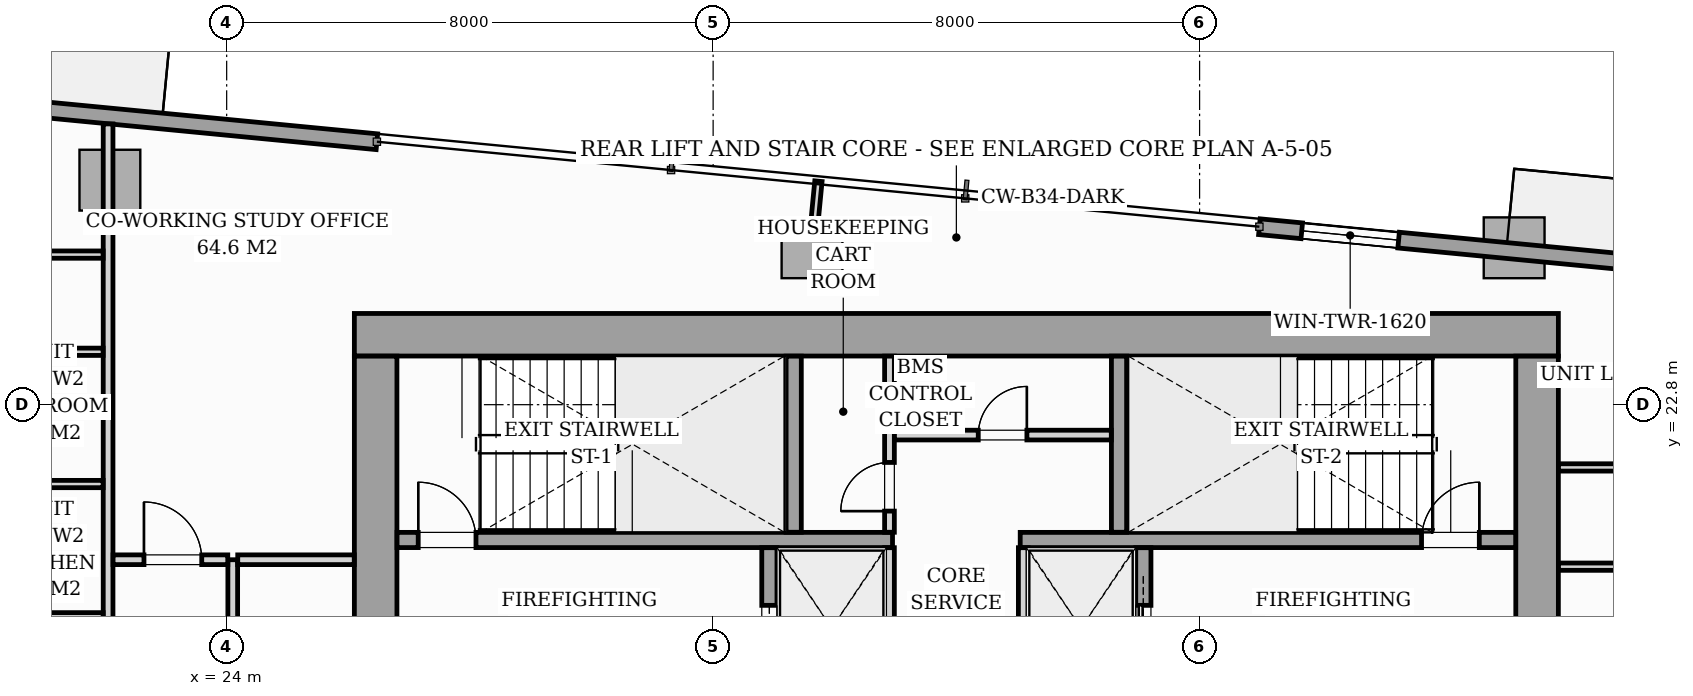
"""IFC4 building model, lengths in metres.
Left out: names, types, materials, properties, quantities, classifications, styles, units other than length and angle.
Written with IfcOpenShell. Run it as: python <this file> out.ifc"""

import sys

from ifc_helpers import new_model, si_unit, direction, frame, frame_2d, origin, origin_2d, place, context, subcontext, project, spatial, rectangle, i_section, extrude, source, transform, mapped, element, fill, save


model = new_model("IFC4")
c1 = context("Model", 3, precision=1e-05, world=origin(), true_north=direction((0.0, 1.0)))
c2 = subcontext(c1, "Body", "Model", "MODEL_VIEW")
j1 = project(units=[si_unit("LENGTHUNIT", "METRE"), si_unit("PLANEANGLEUNIT", "RADIAN")], contexts=[c1])
p1 = place(None, origin())
s1 = spatial("IfcSite", under=j1, at=p1, CompositionType="ELEMENT")
p2 = place(p1, origin())
s2 = spatial("IfcBuilding", under=s1, at=p2, CompositionType="ELEMENT")
p3 = place(p2, frame((0.0, 0.0, 131.0)))
s3 = spatial("IfcBuildingStorey", under=s2, at=p3, CompositionType="ELEMENT", Elevation=131.0)
m1 = source(origin(), c2, "Body", "SweptSolid", [
    extrude(i_section(OverallWidth=0.421, OverallDepth=0.465, WebThickness=0.045, FlangeThickness=0.073, FilletRadius=0.018, at=origin_2d()), origin(), (0.0, 0.0, 1.0), 3.196),
])
for number, where, z_axis, x_axis in (
    (1, (26.4, 24.0, 0.002), (0.0, 0.0, 1.0), (1.0, 0.0, 0.0)),
    (2, (33.12, 24.0, 0.002), (0.0, 0.0, 1.0), (1.0, 0.0, 0.0)),
    (3, (38.88, 24.0, 0.002), (0.0, 0.0, 1.0), (1.0, 0.0, 0.0)),
    (4, (45.6, 24.0, 0.002), (0.0, 0.0, 1.0), (1.0, 0.0, 0.0)),
):
    element("IfcColumn", number, at=place(p3, frame(where, z_axis=z_axis, x_axis=x_axis)), inside=s3, PredefinedType="PILASTER", context=c2, shape_type="MappedRepresentation", body=[
        mapped(m1, transform((0.0, 0.0, 0.0), scale=1.0)),
    ])
m2 = source(origin(), c2, "Body", "SweptSolid", [
    extrude(rectangle(XDim=1.0, YDim=1.0, at=origin_2d()), origin(), (0.0, 0.0, 1.0), 3.196),
])
for number, where, z_axis, x_axis in (
    (5, (22.08, 26.492, 0.002), (0.0, 0.0, 1.0), (0.995, -0.096, 0.0)),
    (6, (33.626, 25.38, 0.002), (0.0, 0.0, 1.0), (0.995, -0.096, 0.0)),
    (7, (45.173, 25.38, 0.002), (0.0, 0.0, 1.0), (0.995, -0.096, 0.0)),
):
    element("IfcColumn", number, at=place(p3, frame(where, z_axis=z_axis, x_axis=x_axis)), inside=s3, PredefinedType="COLUMN", context=c2, shape_type="MappedRepresentation", body=[
        mapped(m2, transform((0.0, 0.0, 0.0), scale=1.0)),
    ])
p4 = place(p3, frame((9.539, 28.754, 0.0), z_axis=(0.0, 0.0, 1.0), x_axis=(0.995397345886, -0.09583383433, 0.0)))
e8 = element("IfcWall", 8, at=p4, inside=s3, PredefinedType="STANDARD", context=c2, shape_type="SweptSolid", body=[
    extrude(rectangle(XDim=17.01, YDim=0.26, at=frame_2d((8.505, 0.0))), origin(), (0.0, 0.0, 1.0), 2.94),
])
p5 = place(p4, frame((6.903, 0.0, 0.0)))
e9 = element("IfcOpeningElement", 9, at=p5, cuts=e8, PredefinedType="OPENING", context=c2, shape_type="SweptSolid", body=[
    extrude(rectangle(XDim=1.8, YDim=2.06, at=frame_2d((0.9, 1.03))), frame((0.0, 0.14, 0.0), z_axis=(0.0, -1.0, 0.0), x_axis=(1.0, 0.0, 0.0)), (0.0, 0.0, 1.0), 0.28),
])
p6 = place(p4, frame((2.05, 0.0, 0.65)))
e10 = element("IfcOpeningElement", 10, at=p6, cuts=e8, PredefinedType="OPENING", context=c2, shape_type="SweptSolid", body=[
    extrude(rectangle(XDim=1.6, YDim=1.5, at=frame_2d((0.8, 0.75))), frame((0.0, 0.14, 0.0), z_axis=(0.0, -1.0, 0.0), x_axis=(1.0, 0.0, 0.0)), (0.0, 0.0, 1.0), 0.28),
])
p7 = place(p3, frame((40.983, 25.727, 0.0), z_axis=(0.0, 0.0, 1.0), x_axis=(0.995395844771, -0.095849424686, 0.0)))
e11 = element("IfcWall", 11, at=p7, inside=s3, PredefinedType="STANDARD", context=c2, shape_type="SweptSolid", body=[
    extrude(rectangle(XDim=17.01, YDim=0.26, at=frame_2d((8.505, 0.0))), origin(), (0.0, 0.0, 1.0), 2.94),
])
p8 = place(p7, frame((9.18, 0.0, 0.0)))
e12 = element("IfcOpeningElement", 12, at=p8, cuts=e11, PredefinedType="OPENING", context=c2, shape_type="SweptSolid", body=[
    extrude(rectangle(XDim=1.8, YDim=2.06, at=frame_2d((0.9, 1.03))), frame((0.0, 0.14, 0.0), z_axis=(0.0, -1.0, 0.0), x_axis=(1.0, 0.0, 0.0)), (0.0, 0.0, 1.0), 0.28),
])
p9 = place(p7, frame((0.7, 0.0, 0.65)))
e13 = element("IfcOpeningElement", 13, at=p9, cuts=e11, PredefinedType="OPENING", context=c2, shape_type="SweptSolid", body=[
    extrude(rectangle(XDim=1.6, YDim=1.5, at=frame_2d((0.8, 0.75))), frame((0.0, 0.14, 0.0), z_axis=(0.0, -1.0, 0.0), x_axis=(1.0, 0.0, 0.0)), (0.0, 0.0, 1.0), 0.28),
])
p10 = place(p3, frame((26.1, 23.95, 0.0), z_axis=(0.0, 0.0, 1.0), x_axis=(1.0, 0.0, 0.0)))
e14 = element("IfcWall", 14, at=p10, inside=s3, PredefinedType="SHEAR", context=c2, shape_type="SweptSolid", body=[
    extrude(rectangle(XDim=19.8, YDim=0.7, at=frame_2d((9.9, 0.0))), origin(), (0.0, 0.0, 1.0), 3.2),
])
for number, where, z_axis, x_axis in (
    (15, (26.45, 17.802, 0.0), (0.0, 0.0, 1.0), (0.0, 1.0, 0.0)),
    (16, (45.55, 17.802, 0.0), (0.0, 0.0, 1.0), (0.0, 1.0, 0.0)),
):
    element("IfcWall", number, at=place(p3, frame(where, z_axis=z_axis, x_axis=x_axis)), inside=s3, PredefinedType="SHEAR", context=c2, shape_type="SweptSolid", body=[
        extrude(rectangle(XDim=5.796, YDim=0.7, at=frame_2d((2.898, 0.0))), origin(), (0.0, 0.0, 1.0), 3.2),
    ])
p11 = place(p3, frame((26.802, 20.575, 0.0), z_axis=(0.0, 0.0, 1.0), x_axis=(1.0, 0.0, 0.0)))
e17 = element("IfcWall", 17, at=p11, inside=s3, PredefinedType="SOLIDWALL", context=c2, shape_type="SweptSolid", body=[
    extrude(rectangle(XDim=8.148, YDim=0.25, at=frame_2d((4.074, 0.0))), origin(), (0.0, 0.0, 1.0), 3.2),
])
p12 = place(p11, frame((0.348, 0.0, 0.0)))
e18 = element("IfcOpeningElement", 18, at=p12, cuts=e17, PredefinedType="OPENING", context=c2, shape_type="SweptSolid", body=[
    extrude(rectangle(XDim=0.95, YDim=2.06, at=frame_2d((0.475, 1.03))), frame((0.0, 0.135, 0.0), z_axis=(0.0, -1.0, 0.0), x_axis=(1.0, 0.0, 0.0)), (0.0, 0.0, 1.0), 0.27),
])
p13 = place(p3, frame((37.05, 20.575, 0.0), z_axis=(0.0, 0.0, 1.0), x_axis=(1.0, 0.0, 0.0)))
e19 = element("IfcWall", 19, at=p13, inside=s3, PredefinedType="SOLIDWALL", context=c2, shape_type="SweptSolid", body=[
    extrude(rectangle(XDim=8.148, YDim=0.25, at=frame_2d((4.074, 0.0))), origin(), (0.0, 0.0, 1.0), 3.2),
])
p14 = place(p13, frame((6.6, 0.0, 0.0)))
e20 = element("IfcOpeningElement", 20, at=p14, cuts=e19, PredefinedType="OPENING", context=c2, shape_type="SweptSolid", body=[
    extrude(rectangle(XDim=0.95, YDim=2.06, at=frame_2d((0.475, 1.03))), frame((0.0, 0.135, 0.0), z_axis=(0.0, -1.0, 0.0), x_axis=(1.0, 0.0, 0.0)), (0.0, 0.0, 1.0), 0.27),
])
for number, where, z_axis, x_axis in (
    (21, (33.325, 20.702, 0.0), (0.0, 0.0, 1.0), (0.0, 1.0, 0.0)),
    (22, (38.675, 20.702, 0.0), (0.0, 0.0, 1.0), (0.0, 1.0, 0.0)),
):
    element("IfcWall", number, at=place(p3, frame(where, z_axis=z_axis, x_axis=x_axis)), inside=s3, PredefinedType="SOLIDWALL", context=c2, shape_type="SweptSolid", body=[
        extrude(rectangle(XDim=2.896, YDim=0.25, at=frame_2d((1.448, 0.0))), origin(), (0.0, 0.0, 1.0), 3.2),
    ])
p15 = place(p3, frame((32.925, 17.802, 0.0), z_axis=(0.0, 0.0, 1.0), x_axis=(0.0, 1.0, 0.0)))
e23 = element("IfcWall", 23, at=p15, inside=s3, PredefinedType="SOLIDWALL", context=c2, shape_type="SweptSolid", body=[
    extrude(rectangle(XDim=2.646, YDim=0.25, at=frame_2d((1.323, 0.0))), origin(), (0.0, 0.0, 1.0), 3.2),
])
p16 = place(p15, frame((0.598, 0.0, 0.0)))
e24 = element("IfcOpeningElement", 24, at=p16, cuts=e23, PredefinedType="OPENING", context=c2, shape_type="SweptSolid", body=[
    extrude(rectangle(XDim=1.1, YDim=2.08, at=frame_2d((0.55, 1.04))), frame((0.0, 0.135, 0.0), z_axis=(0.0, -1.0, 0.0), x_axis=(1.0, 0.0, 0.0)), (0.0, 0.0, 1.0), 0.27),
])
for number, where, z_axis, x_axis in (
    (25, (34.9, 17.802, 0.0), (0.0, 0.0, 1.0), (0.0, 1.0, 0.0)),
    (26, (37.1, 17.802, 0.0), (0.0, 0.0, 1.0), (0.0, 1.0, 0.0)),
):
    element("IfcWall", number, at=place(p3, frame(where, z_axis=z_axis, x_axis=x_axis)), inside=s3, PredefinedType="PARTITIONING", context=c2, shape_type="SweptSolid", body=[
        extrude(rectangle(XDim=2.646, YDim=0.16, at=frame_2d((1.323, 0.0))), origin(), (0.0, 0.0, 1.0), 2.94),
    ])
p17 = place(p3, frame((39.075, 17.802, 0.0), z_axis=(0.0, 0.0, 1.0), x_axis=(0.0, 1.0, 0.0)))
e27 = element("IfcWall", 27, at=p17, inside=s3, PredefinedType="SOLIDWALL", context=c2, shape_type="SweptSolid", body=[
    extrude(rectangle(XDim=2.646, YDim=0.25, at=frame_2d((1.323, 0.0))), origin(), (0.0, 0.0, 1.0), 3.2),
])
p18 = place(p17, frame((0.598, 0.0, 0.0)))
e28 = element("IfcOpeningElement", 28, at=p18, cuts=e27, PredefinedType="OPENING", context=c2, shape_type="SweptSolid", body=[
    extrude(rectangle(XDim=1.1, YDim=2.08, at=frame_2d((0.55, 1.04))), frame((0.0, 0.135, 0.0), z_axis=(0.0, -1.0, 0.0), x_axis=(1.0, 0.0, 0.0)), (0.0, 0.0, 1.0), 0.27),
])
p19 = place(p3, frame((34.9, 20.702, 0.0), z_axis=(0.0, 0.0, 1.0), x_axis=(0.0, 1.0, 0.0)))
e29 = element("IfcWall", 29, at=p19, inside=s3, PredefinedType="PARTITIONING", context=c2, shape_type="SweptSolid", body=[
    extrude(rectangle(XDim=2.896, YDim=0.16, at=frame_2d((1.448, 0.0))), origin(), (0.0, 0.0, 1.0), 2.94),
])
p20 = place(p19, frame((0.348, 0.0, 0.0)))
e30 = element("IfcOpeningElement", 30, at=p20, cuts=e29, PredefinedType="OPENING", context=c2, shape_type="SweptSolid", body=[
    extrude(rectangle(XDim=0.8, YDim=2.05, at=frame_2d((0.4, 1.025))), frame((0.0, 0.09, 0.0), z_axis=(0.0, -1.0, 0.0), x_axis=(1.0, 0.0, 0.0)), (0.0, 0.0, 1.0), 0.18),
])
p21 = place(p3, frame((34.982, 22.3, 0.0), z_axis=(0.0, 0.0, 1.0), x_axis=(1.0, 0.0, 0.0)))
e31 = element("IfcWall", 31, at=p21, inside=s3, PredefinedType="PARTITIONING", context=c2, shape_type="SweptSolid", body=[
    extrude(rectangle(XDim=3.566, YDim=0.16, at=frame_2d((1.783, 0.0))), origin(), (0.0, 0.0, 1.0), 2.94),
])
p22 = place(p21, frame((1.378, 0.0, 0.0)))
e32 = element("IfcOpeningElement", 32, at=p22, cuts=e31, PredefinedType="OPENING", context=c2, shape_type="SweptSolid", body=[
    extrude(rectangle(XDim=0.8, YDim=2.05, at=frame_2d((0.4, 1.025))), frame((0.0, 0.09, 0.0), z_axis=(0.0, -1.0, 0.0), x_axis=(1.0, 0.0, 0.0)), (0.0, 0.0, 1.0), 0.18),
])
p23 = place(p3, frame((22.05, 12.732, 0.0), z_axis=(0.0, 0.0, 1.0), x_axis=(0.0, 1.0, 0.0)))
e33 = element("IfcWall", 33, at=p23, inside=s3, PredefinedType="PARTITIONING", context=c2, shape_type="SweptSolid", body=[
    extrude(rectangle(XDim=14.685, YDim=0.16, at=frame_2d((7.343, 0.0))), origin(), (0.0, 0.0, 1.0), 2.94),
])
p24 = place(p23, frame((0.493, 0.0, 0.0)))
e34 = element("IfcOpeningElement", 34, at=p24, cuts=e33, PredefinedType="OPENING", context=c2, shape_type="SweptSolid", body=[
    extrude(rectangle(XDim=0.95, YDim=2.06, at=frame_2d((0.475, 1.03))), frame((0.0, 0.09, 0.0), z_axis=(0.0, -1.0, 0.0), x_axis=(1.0, 0.0, 0.0)), (0.0, 0.0, 1.0), 0.18),
])
p25 = place(p23, frame((5.313, 0.0, 0.0)))
e35 = element("IfcOpeningElement", 35, at=p25, cuts=e33, PredefinedType="OPENING", context=c2, shape_type="SweptSolid", body=[
    extrude(rectangle(XDim=0.85, YDim=2.0, at=frame_2d((0.425, 1.0))), frame((0.0, 0.09, 0.0), z_axis=(0.0, -1.0, 0.0), x_axis=(1.0, 0.0, 0.0)), (0.0, 0.0, 1.0), 0.18),
])
for number, where, z_axis, x_axis in (
    (36, (19.712, 21.495, 0.0), (0.0, 0.0, 1.0), (1.0, 0.0, 0.0)),
    (37, (19.712, 19.32, 0.0), (0.0, 0.0, 1.0), (1.0, 0.0, 0.0)),
    (38, (19.712, 23.67, 0.0), (0.0, 0.0, 1.0), (1.0, 0.0, 0.0)),
):
    element("IfcWall", number, at=place(p3, frame(where, z_axis=z_axis, x_axis=x_axis)), inside=s3, PredefinedType="PARTITIONING", context=c2, shape_type="SweptSolid", body=[
        extrude(rectangle(XDim=2.256, YDim=0.12, at=frame_2d((1.128, 0.0))), origin(), (0.0, 0.0, 1.0), 2.94),
    ])
p26 = place(p3, frame((14.426, 25.268, 0.0), z_axis=(0.0, 0.0, 1.0), x_axis=(1.0, 0.0, 0.0)))
e39 = element("IfcWall", 39, at=p26, inside=s3, PredefinedType="PARTITIONING", context=c2, shape_type="SweptSolid", body=[
    extrude(rectangle(XDim=7.542, YDim=0.12, at=frame_2d((3.771, 0.0))), origin(), (0.0, 0.0, 1.0), 2.94),
])
p27 = place(p26, frame((3.316, 0.0, 0.0)))
e40 = element("IfcOpeningElement", 40, at=p27, cuts=e39, PredefinedType="OPENING", context=c2, shape_type="SweptSolid", body=[
    extrude(rectangle(XDim=0.85, YDim=2.05, at=frame_2d((0.425, 1.025))), frame((0.0, 0.07, 0.0), z_axis=(0.0, -1.0, 0.0), x_axis=(1.0, 0.0, 0.0)), (0.0, 0.0, 1.0), 0.14),
])
p28 = place(p3, frame((45.902, 21.768, 0.0), z_axis=(0.0, 0.0, 1.0), x_axis=(1.0, 0.0, 0.0)))
e41 = element("IfcWall", 41, at=p28, inside=s3, PredefinedType="PARTITIONING", context=c2, shape_type="SweptSolid", body=[
    extrude(rectangle(XDim=12.781, YDim=0.12, at=frame_2d((6.391, 0.0))), origin(), (0.0, 0.0, 1.0), 2.94),
])
p29 = place(p28, frame((6.146, 0.0, 0.0)))
e42 = element("IfcOpeningElement", 42, at=p29, cuts=e41, PredefinedType="OPENING", context=c2, shape_type="SweptSolid", body=[
    extrude(rectangle(XDim=0.85, YDim=2.05, at=frame_2d((0.425, 1.025))), frame((0.0, 0.07, 0.0), z_axis=(0.0, -1.0, 0.0), x_axis=(1.0, 0.0, 0.0)), (0.0, 0.0, 1.0), 0.14),
])
p30 = place(p3, frame((45.902, 20.136, 0.0), z_axis=(0.0, 0.0, 1.0), x_axis=(1.0, 0.0, 0.0)))
e43 = element("IfcWall", 43, at=p30, inside=s3, PredefinedType="PARTITIONING", context=c2, shape_type="SweptSolid", body=[
    extrude(rectangle(XDim=14.063, YDim=0.12, at=frame_2d((7.031, 0.0))), origin(), (0.0, 0.0, 1.0), 2.94),
])
p31 = place(p30, frame((6.708, 0.0, 0.0)))
e44 = element("IfcOpeningElement", 44, at=p31, cuts=e43, PredefinedType="OPENING", context=c2, shape_type="SweptSolid", body=[
    extrude(rectangle(XDim=0.85, YDim=2.05, at=frame_2d((0.425, 1.025))), frame((0.0, 0.07, 0.0), z_axis=(0.0, -1.0, 0.0), x_axis=(1.0, 0.0, 0.0)), (0.0, 0.0, 1.0), 0.14),
])
p32 = place(p3, frame((24.1, 14.66, 0.0), z_axis=(0.0, 0.0, 1.0), x_axis=(0.0, 1.0, 0.0)))
e45 = element("IfcWall", 45, at=p32, inside=s3, PredefinedType="PARTITIONING", context=c2, shape_type="SweptSolid", body=[
    extrude(rectangle(XDim=5.59, YDim=0.16, at=frame_2d((2.795, 0.0))), origin(), (0.0, 0.0, 1.0), 2.94),
])
p33 = place(p32, frame((2.36, 0.0, 0.0)))
e46 = element("IfcOpeningElement", 46, at=p33, cuts=e45, PredefinedType="OPENING", context=c2, shape_type="SweptSolid", body=[
    extrude(rectangle(XDim=0.85, YDim=2.0, at=frame_2d((0.425, 1.0))), frame((0.0, 0.09, 0.0), z_axis=(0.0, -1.0, 0.0), x_axis=(1.0, 0.0, 0.0)), (0.0, 0.0, 1.0), 0.18),
])
p34 = place(p3, frame((22.132, 20.25, 0.0), z_axis=(0.0, 0.0, 1.0), x_axis=(1.0, 0.0, 0.0)))
e47 = element("IfcWall", 47, at=p34, inside=s3, PredefinedType="PARTITIONING", context=c2, shape_type="SweptSolid", body=[
    extrude(rectangle(XDim=1.886, YDim=0.16, at=frame_2d((0.943, 0.0))), origin(), (0.0, 0.0, 1.0), 2.94),
])
p35 = place(p34, frame((0.508, 0.0, 0.0)))
e48 = element("IfcOpeningElement", 48, at=p35, cuts=e47, PredefinedType="OPENING", context=c2, shape_type="SweptSolid", body=[
    extrude(rectangle(XDim=0.95, YDim=2.06, at=frame_2d((0.475, 1.03))), frame((0.0, 0.09, 0.0), z_axis=(0.0, -1.0, 0.0), x_axis=(1.0, 0.0, 0.0)), (0.0, 0.0, 1.0), 0.18),
])
p36 = place(p3, frame((24.182, 20.25, 0.0), z_axis=(0.0, 0.0, 1.0), x_axis=(1.0, 0.0, 0.0)))
e49 = element("IfcWall", 49, at=p36, inside=s3, PredefinedType="PARTITIONING", context=c2, shape_type="SweptSolid", body=[
    extrude(rectangle(XDim=1.916, YDim=0.16, at=frame_2d((0.958, 0.0))), origin(), (0.0, 0.0, 1.0), 2.94),
])
p37 = place(p3, frame((33.663, 25.759, 0.0), z_axis=(0.0, 0.0, 1.0), x_axis=(0.095977354523, 0.995383517755, 0.0)))
e50 = element("IfcWall", 50, at=p37, inside=s3, PredefinedType="PARTITIONING", context=c2, shape_type="SweptSolid", body=[
    extrude(rectangle(XDim=0.72, YDim=0.12, at=frame_2d((0.36, 0.0))), origin(), (0.0, 0.0, 1.0), 2.94),
])
m3 = source(origin(), c2, "Body", "SweptSolid", [
    extrude(rectangle(XDim=1.6, YDim=1.5, at=frame_2d((0.8, 0.75))), frame((0.0, 0.03, 0.0), z_axis=(0.0, -1.0, 0.0), x_axis=(1.0, 0.0, 0.0)), (0.0, 0.0, 1.0), 0.06),
])
p38 = place(p9, origin())
e51 = element("IfcWindow", 51, at=p38, inside=s3, PartitioningType="SINGLE_PANEL", PredefinedType="WINDOW", context=c2, shape_type="MappedRepresentation", body=[
    mapped(m3, transform((0.0, 0.0, 0.0), scale=1.0)),
])
fill(e13, e51)
m4 = source(origin(), c2, "Body", "SweptSolid", [
    extrude(rectangle(XDim=0.95, YDim=2.06, at=frame_2d((0.475, 1.03))), frame((0.0, 0.025, 0.0), z_axis=(0.0, -1.0, 0.0), x_axis=(1.0, 0.0, 0.0)), (0.0, 0.0, 1.0), 0.05),
])
p39 = place(p12, origin())
e52 = element("IfcDoor", 52, at=p39, inside=s3, OperationType="SINGLE_SWING_LEFT", PredefinedType="DOOR", context=c2, shape_type="MappedRepresentation", body=[
    mapped(m4, transform((0.0, 0.0, 0.0), scale=1.0)),
])
fill(e18, e52)
p40 = place(p14, origin())
e53 = element("IfcDoor", 53, at=p40, inside=s3, OperationType="SINGLE_SWING_RIGHT", PredefinedType="DOOR", context=c2, shape_type="MappedRepresentation", body=[
    mapped(m4, transform((0.0, 0.0, 0.0), scale=1.0)),
])
fill(e20, e53)
m5 = source(origin(), c2, "Body", "SweptSolid", [
    extrude(rectangle(XDim=1.1, YDim=2.08, at=frame_2d((0.55, 1.04))), frame((0.0, 0.025, 0.0), z_axis=(0.0, -1.0, 0.0), x_axis=(1.0, 0.0, 0.0)), (0.0, 0.0, 1.0), 0.05),
])
p41 = place(p16, origin())
e54 = element("IfcDoor", 54, at=p41, inside=s3, OperationType="SLIDING_TO_LEFT", PredefinedType="DOOR", context=c2, shape_type="MappedRepresentation", body=[
    mapped(m5, transform((0.0, 0.0, 0.0), scale=1.0)),
])
fill(e24, e54)
p42 = place(p18, origin())
e55 = element("IfcDoor", 55, at=p42, inside=s3, OperationType="SLIDING_TO_RIGHT", PredefinedType="DOOR", context=c2, shape_type="MappedRepresentation", body=[
    mapped(m5, transform((0.0, 0.0, 0.0), scale=1.0)),
])
fill(e28, e55)
m6 = source(origin(), c2, "Body", "SweptSolid", [
    extrude(rectangle(XDim=0.8, YDim=2.05, at=frame_2d((0.4, 1.025))), frame((0.0, 0.025, 0.0), z_axis=(0.0, -1.0, 0.0), x_axis=(1.0, 0.0, 0.0)), (0.0, 0.0, 1.0), 0.05),
])
p43 = place(p20, origin())
e56 = element("IfcDoor", 56, at=p43, inside=s3, OperationType="SINGLE_SWING_LEFT", PredefinedType="DOOR", context=c2, shape_type="MappedRepresentation", body=[
    mapped(m6, transform((0.0, 0.0, 0.0), scale=1.0)),
])
fill(e30, e56)
p44 = place(p22, origin())
e57 = element("IfcDoor", 57, at=p44, inside=s3, OperationType="SINGLE_SWING_RIGHT", PredefinedType="DOOR", context=c2, shape_type="MappedRepresentation", body=[
    mapped(m6, transform((0.0, 0.0, 0.0), scale=1.0)),
])
fill(e32, e57)
m7 = source(origin(), c2, "Body", "SweptSolid", [
    extrude(rectangle(XDim=0.95, YDim=2.06, at=frame_2d((0.475, 1.03))), frame((0.0, 0.025, 0.0), z_axis=(0.0, -1.0, 0.0), x_axis=(1.0, 0.0, 0.0)), (0.0, 0.0, 1.0), 0.05),
])
p45 = place(p35, origin())
e58 = element("IfcDoor", 58, at=p45, inside=s3, OperationType="SINGLE_SWING_LEFT", PredefinedType="DOOR", context=c2, shape_type="MappedRepresentation", body=[
    mapped(m7, transform((0.0, 0.0, 0.0), scale=1.0)),
])
fill(e48, e58)
save(model, sys.argv[1])
